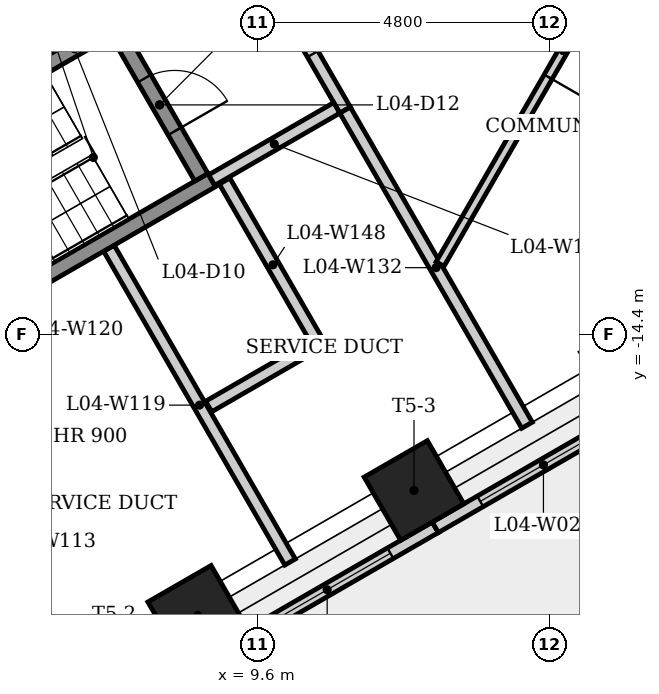
"""IFC4 building model, lengths in metres.
Left out: names, types, materials, properties, quantities, classifications, styles, units other than length and angle.
Written with IfcOpenShell. Run it as: python <this file> out.ifc"""

import sys

from ifc_helpers import new_model, si_unit, direction, frame, frame_2d, origin, origin_2d, place, context, subcontext, project, spatial, rectangle, extrude, element, fill, save


model = new_model("IFC4")
c1 = context("Model", 3, precision=1e-05, world=origin(), true_north=direction((0.0, 1.0)))
c2 = subcontext(c1, "Body", "Model", "MODEL_VIEW")
j1 = project(units=[si_unit("LENGTHUNIT", "METRE"), si_unit("PLANEANGLEUNIT", "RADIAN")], contexts=[c1])
p1 = place(None, origin())
s1 = spatial("IfcSite", under=j1, at=p1, CompositionType="ELEMENT")
p2 = place(p1, origin())
s2 = spatial("IfcBuilding", under=s1, at=p2, CompositionType="ELEMENT")
p3 = place(p2, frame((0.0, 0.0, 20.5)))
s3 = spatial("IfcBuildingStorey", under=s2, at=p3, CompositionType="ELEMENT", Elevation=20.5)
p4 = place(p3, frame((-0.2, -10.623, 0.0), z_axis=(0.0, 0.0, 1.0), x_axis=(0.866023993627, 0.500002442456, 0.0)))
e1 = element("IfcWall", 1, at=p4, inside=s3, PredefinedType="SHEAR", context=c2, shape_type="SweptSolid", body=[
    extrude(rectangle(XDim=10.97, YDim=0.8, at=frame_2d((5.485, 0.0))), origin(), (0.0, 0.0, 1.0), 5.0),
])
p5 = place(p4, frame((7.108, 0.0, 0.0)))
e2 = element("IfcOpeningElement", 2, at=p5, cuts=e1, PredefinedType="OPENING", context=c2, shape_type="SweptSolid", body=[
    extrude(rectangle(XDim=0.9, YDim=2.1, at=frame_2d((0.45, 1.05))), frame((0.0, 0.41, 0.0), z_axis=(0.0, -1.0, 0.0), x_axis=(1.0, 0.0, 0.0)), (0.0, 0.0, 1.0), 0.82),
])
for number, where, z_axis, x_axis in (
    (3, (8.614, -19.027, 0.0), (0.0, 0.0, 1.0), (0.5, -0.866, 0.0)),
    (4, (12.171, -16.973, 0.0), (0.0, 0.0, 1.0), (0.5, -0.866, 0.0)),
):
    element("IfcColumn", number, at=place(p3, frame(where, z_axis=z_axis, x_axis=x_axis)), inside=s3, PredefinedType="COLUMN", context=c2, shape_type="SweptSolid", body=[
        extrude(rectangle(XDim=1.2, YDim=1.2, at=origin_2d()), origin(), (0.0, 0.0, 1.0), 5.0),
    ])
p6 = place(p3, frame((8.964, -19.633, 0.0), z_axis=(0.0, 0.0, 1.0), x_axis=(0.866021252249, 0.500007190601, 0.0)))
e5 = element("IfcWall", 5, at=p6, inside=s3, PredefinedType="SOLIDWALL", context=c2, shape_type="SweptSolid", body=[
    extrude(rectangle(XDim=4.107, YDim=0.2, at=frame_2d((2.053, 0.0))), origin(), (0.0, 0.0, 1.0), 4.88),
])
p7 = place(p6, frame((0.854, 0.0, 0.8)))
e6 = element("IfcOpeningElement", 6, at=p7, cuts=e5, PredefinedType="OPENING", context=c2, shape_type="SweptSolid", body=[
    extrude(rectangle(XDim=2.4, YDim=2.4, at=frame_2d((1.2, 1.2))), frame((0.0, 0.11, 0.0), z_axis=(0.0, -1.0, 0.0), x_axis=(1.0, 0.0, 0.0)), (0.0, 0.0, 1.0), 0.22),
])
p8 = place(p3, frame((12.521, -17.579, 0.0), z_axis=(0.0, 0.0, 1.0), x_axis=(0.866036113234, 0.499981450231, 0.0)))
e7 = element("IfcWall", 7, at=p8, inside=s3, PredefinedType="SOLIDWALL", context=c2, shape_type="SweptSolid", body=[
    extrude(rectangle(XDim=4.107, YDim=0.2, at=frame_2d((2.054, 0.0))), origin(), (0.0, 0.0, 1.0), 4.88),
])
p9 = place(p8, frame((0.854, 0.0, 0.8)))
e8 = element("IfcOpeningElement", 8, at=p9, cuts=e7, PredefinedType="OPENING", context=c2, shape_type="SweptSolid", body=[
    extrude(rectangle(XDim=2.4, YDim=2.4, at=frame_2d((1.2, 1.2))), frame((0.0, 0.11, 0.0), z_axis=(0.0, -1.0, 0.0), x_axis=(1.0, 0.0, 0.0)), (0.0, 0.0, 1.0), 0.22),
])
p10 = place(p3, frame((1.585, -12.595, 0.0), z_axis=(0.0, 0.0, 1.0), x_axis=(0.866036417653, 0.499980922934, 0.0)))
e9 = element("IfcWall", 9, at=p10, inside=s3, PredefinedType="SHEAR", context=c2, shape_type="SweptSolid", body=[
    extrude(rectangle(XDim=6.65, YDim=0.25, at=frame_2d((3.325, 0.0))), origin(), (0.0, 0.0, 1.0), 4.65),
])
p11 = place(p10, frame((5.275, 0.0, 0.0)))
e10 = element("IfcOpeningElement", 10, at=p11, cuts=e9, PredefinedType="OPENING", context=c2, shape_type="SweptSolid", body=[
    extrude(rectangle(XDim=1.0, YDim=2.1, at=frame_2d((0.5, 1.05))), frame((0.0, 0.135, 0.0), z_axis=(0.0, -1.0, 0.0), x_axis=(1.0, 0.0, 0.0)), (0.0, 0.0, 1.0), 0.27),
])
p12 = place(p3, frame((3.256, -15.239, 0.0), z_axis=(0.0, 0.0, 1.0), x_axis=(0.499994325412, -0.866028679985, 0.0)))
e11 = element("IfcWall", 11, at=p12, inside=s3, PredefinedType="PLUMBINGWALL", context=c2, shape_type="SweptSolid", body=[
    extrude(rectangle(XDim=5.959, YDim=0.2, at=frame_2d((2.98, 0.0))), origin(), (0.0, 0.0, 1.0), 4.65),
])
p13 = place(p3, frame((7.153, -12.989, 0.0), z_axis=(0.0, 0.0, 1.0), x_axis=(0.500025049464, -0.866010940986, 0.0)))
e12 = element("IfcWall", 12, at=p13, inside=s3, PredefinedType="PLUMBINGWALL", context=c2, shape_type="SweptSolid", body=[
    extrude(rectangle(XDim=5.96, YDim=0.2, at=frame_2d((2.98, 0.0))), origin(), (0.0, 0.0, 1.0), 4.65),
])
p14 = place(p3, frame((3.301, -15.068, 0.0), z_axis=(0.0, 0.0, 1.0), x_axis=(0.866035036182, 0.499983315828, 0.0)))
e13 = element("IfcWall", 13, at=p14, inside=s3, PredefinedType="SHEAR", context=c2, shape_type="SweptSolid", body=[
    extrude(rectangle(XDim=6.4, YDim=0.25, at=frame_2d((3.2, 0.0))), origin(), (0.0, 0.0, 1.0), 4.65),
])
p15 = place(p3, frame((7.298, -9.441, 0.0), z_axis=(0.0, 0.0, 1.0), x_axis=(0.500034990121, -0.866005201286, 0.0)))
e14 = element("IfcWall", 14, at=p15, inside=s3, PredefinedType="SHEAR", context=c2, shape_type="SweptSolid", body=[
    extrude(rectangle(XDim=2.75, YDim=0.25, at=frame_2d((1.375, 0.0))), origin(), (0.0, 0.0, 1.0), 4.65),
])
p16 = place(p15, frame((0.875, 0.0, 0.0)))
e15 = element("IfcOpeningElement", 15, at=p16, cuts=e14, PredefinedType="OPENING", context=c2, shape_type="SweptSolid", body=[
    extrude(rectangle(XDim=1.0, YDim=2.1, at=frame_2d((0.5, 1.05))), frame((0.0, 0.135, 0.0), z_axis=(0.0, -1.0, 0.0), x_axis=(1.0, 0.0, 0.0)), (0.0, 0.0, 1.0), 0.27),
])
p17 = place(p3, frame((9.537, -8.119, 0.0), z_axis=(0.0, 0.0, 1.0), x_axis=(0.499990139034, -0.866031096941, 0.0)))
e16 = element("IfcWall", 16, at=p17, inside=s3, PredefinedType="PARTITIONING", context=c2, shape_type="SweptSolid", body=[
    extrude(rectangle(XDim=3.0, YDim=0.2, at=frame_2d((1.5, 0.0))), origin(), (0.0, 0.0, 1.0), 4.65),
])
p18 = place(p17, frame((0.935, 0.0, 0.0)))
e17 = element("IfcOpeningElement", 17, at=p18, cuts=e16, PredefinedType="OPENING", context=c2, shape_type="SweptSolid", body=[
    extrude(rectangle(XDim=1.0, YDim=2.1, at=frame_2d((0.5, 1.05))), frame((0.0, 0.11, 0.0), z_axis=(0.0, -1.0, 0.0), x_axis=(1.0, 0.0, 0.0)), (0.0, 0.0, 1.0), 0.22),
])
p19 = place(p3, frame((10.901, -10.681, 0.0), z_axis=(0.0, 0.0, 1.0), x_axis=(-0.866007538022, -0.500030943131, 0.0)))
e18 = element("IfcWall", 18, at=p19, inside=s3, PredefinedType="PLUMBINGWALL", context=c2, shape_type="SweptSolid", body=[
    extrude(rectangle(XDim=2.375, YDim=0.2, at=frame_2d((1.188, 0.0))), origin(), (0.0, 0.0, 1.0), 4.65),
])
p20 = place(p3, frame((11.037, -10.717, 0.0), z_axis=(0.0, 0.0, 1.0), x_axis=(0.500000259638, -0.866025253883, 0.0)))
e19 = element("IfcWall", 19, at=p20, inside=s3, PredefinedType="PLUMBINGWALL", context=c2, shape_type="SweptSolid", body=[
    extrude(rectangle(XDim=5.984, YDim=0.2, at=frame_2d((2.992, 0.0))), origin(), (0.0, 0.0, 1.0), 4.65),
])
p21 = place(p3, frame((16.654, -6.226, 0.0), z_axis=(0.0, 0.0, 1.0), x_axis=(-0.500004743543, -0.866022665081, 0.0)))
e20 = element("IfcWall", 20, at=p21, inside=s3, PredefinedType="PARTITIONING", context=c2, shape_type="SweptSolid", body=[
    extrude(rectangle(XDim=8.11, YDim=0.15, at=frame_2d((4.055, 0.0))), origin(), (0.0, 0.0, 1.0), 4.65),
])
p22 = place(p21, frame((3.555, 0.0, 0.0)))
e21 = element("IfcOpeningElement", 21, at=p22, cuts=e20, PredefinedType="OPENING", context=c2, shape_type="SweptSolid", body=[
    extrude(rectangle(XDim=1.0, YDim=2.1, at=frame_2d((0.5, 1.05))), frame((0.0, 0.085, 0.0), z_axis=(0.0, -1.0, 0.0), x_axis=(1.0, 0.0, 0.0)), (0.0, 0.0, 1.0), 0.17),
])
p23 = place(p3, frame((9.055, -11.885, 0.0), z_axis=(0.0, 0.0, 1.0), x_axis=(0.50002815445, -0.866009148195, 0.0)))
e22 = element("IfcWall", 22, at=p23, inside=s3, PredefinedType="PLUMBINGWALL", context=c2, shape_type="SweptSolid", body=[
    extrude(rectangle(XDim=3.18, YDim=0.2, at=frame_2d((1.59, 0.0))), origin(), (0.0, 0.0, 1.0), 4.65),
])
p24 = place(p3, frame((10.509, -14.602, 0.0), z_axis=(0.0, 0.0, 1.0), x_axis=(-0.866011036969, -0.500024883228, 0.0)))
e23 = element("IfcWall", 23, at=p24, inside=s3, PredefinedType="PLUMBINGWALL", context=c2, shape_type="SweptSolid", body=[
    extrude(rectangle(XDim=1.98, YDim=0.2, at=frame_2d((0.99, 0.0))), origin(), (0.0, 0.0, 1.0), 4.65),
])
p25 = place(p7, origin())
e24 = element("IfcWindow", 24, at=p25, inside=s3, PartitioningType="SINGLE_PANEL", PredefinedType="WINDOW", context=c2, shape_type="SweptSolid", body=[
    extrude(rectangle(XDim=2.4, YDim=2.4, at=frame_2d((1.2, 1.2))), frame((0.0, 0.03, 0.0), z_axis=(0.0, -1.0, 0.0), x_axis=(1.0, 0.0, 0.0)), (0.0, 0.0, 1.0), 0.06),
])
fill(e6, e24)
p26 = place(p9, origin())
e25 = element("IfcWindow", 25, at=p26, inside=s3, PartitioningType="SINGLE_PANEL", PredefinedType="WINDOW", context=c2, shape_type="SweptSolid", body=[
    extrude(rectangle(XDim=2.4, YDim=2.4, at=frame_2d((1.2, 1.2))), frame((0.0, 0.03, 0.0), z_axis=(0.0, -1.0, 0.0), x_axis=(1.0, 0.0, 0.0)), (0.0, 0.0, 1.0), 0.06),
])
fill(e8, e25)
p27 = place(p11, origin())
e26 = element("IfcDoor", 26, at=p27, inside=s3, OperationType="SINGLE_SWING_RIGHT", PredefinedType="DOOR", context=c2, shape_type="SweptSolid", body=[
    extrude(rectangle(XDim=1.0, YDim=2.1, at=frame_2d((0.5, 1.05))), frame((0.0, 0.025, 0.0), z_axis=(0.0, -1.0, 0.0), x_axis=(1.0, 0.0, 0.0)), (0.0, 0.0, 1.0), 0.05),
])
fill(e10, e26)
p28 = place(p18, origin())
e27 = element("IfcDoor", 27, at=p28, inside=s3, OperationType="SINGLE_SWING_LEFT", PredefinedType="DOOR", context=c2, shape_type="SweptSolid", body=[
    extrude(rectangle(XDim=1.0, YDim=2.1, at=frame_2d((0.5, 1.05))), frame((0.0, 0.025, 0.0), z_axis=(0.0, -1.0, 0.0), x_axis=(1.0, 0.0, 0.0)), (0.0, 0.0, 1.0), 0.05),
])
fill(e17, e27)
p29 = place(p16, origin())
e28 = element("IfcDoor", 28, at=p29, inside=s3, OperationType="SINGLE_SWING_RIGHT", PredefinedType="DOOR", context=c2, shape_type="SweptSolid", body=[
    extrude(rectangle(XDim=1.0, YDim=2.1, at=frame_2d((0.5, 1.05))), frame((0.0, 0.025, 0.0), z_axis=(0.0, -1.0, 0.0), x_axis=(1.0, 0.0, 0.0)), (0.0, 0.0, 1.0), 0.05),
])
fill(e15, e28)
p30 = place(p22, origin())
e29 = element("IfcDoor", 29, at=p30, inside=s3, OperationType="SINGLE_SWING_RIGHT", PredefinedType="DOOR", context=c2, shape_type="SweptSolid", body=[
    extrude(rectangle(XDim=1.0, YDim=2.1, at=frame_2d((0.5, 1.05))), frame((0.0, 0.025, 0.0), z_axis=(0.0, -1.0, 0.0), x_axis=(1.0, 0.0, 0.0)), (0.0, 0.0, 1.0), 0.05),
])
fill(e21, e29)
save(model, sys.argv[1])
